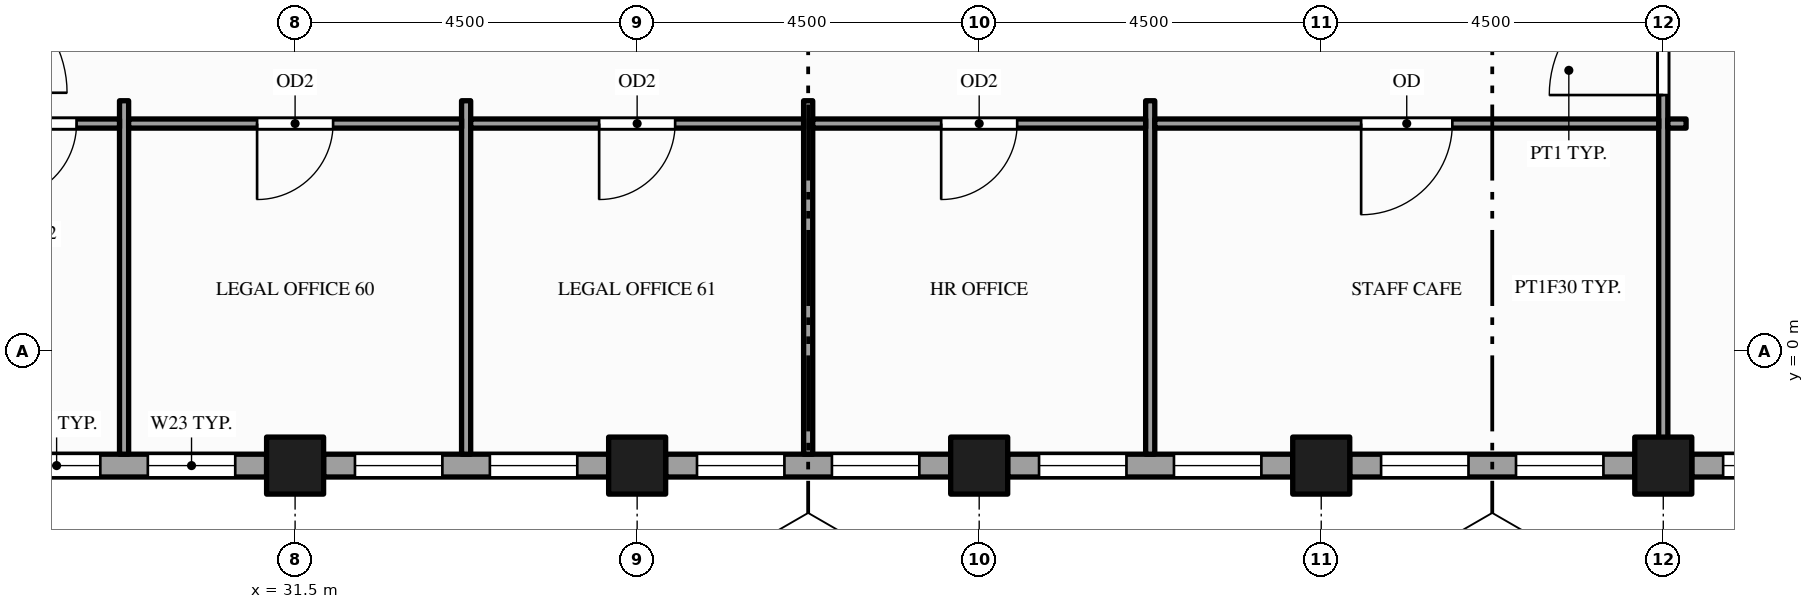
"""IFC4 building model, lengths in metres.
Left out: names, types, materials, properties, quantities, classifications, styles, units other than length and angle.
Written with IfcOpenShell. Run it as: python <this file> out.ifc"""

import sys

from ifc_helpers import new_model, si_unit, direction, frame, frame_2d, origin, origin_2d, place, context, subcontext, project, spatial, rectangle, hollow_rectangle, extrude, element, fill, save


model = new_model("IFC4")
c1 = context("Model", 3, precision=1e-05, world=origin(), true_north=direction((0.0, 1.0)))
c2 = subcontext(c1, "Body", "Model", "MODEL_VIEW")
j1 = project(units=[si_unit("LENGTHUNIT", "METRE"), si_unit("PLANEANGLEUNIT", "RADIAN")], contexts=[c1])
p1 = place(None, origin())
s1 = spatial("IfcSite", under=j1, at=p1, CompositionType="ELEMENT")
p2 = place(p1, origin())
s2 = spatial("IfcBuilding", under=s1, at=p2, CompositionType="ELEMENT")
p3 = place(p2, frame((0.0, 0.0, 223.0)))
s3 = spatial("IfcBuildingStorey", under=s2, at=p3, CompositionType="ELEMENT", Elevation=223.0)
for number, where, z_axis, x_axis in (
    (1, (31.5, -1.5, -0.15), (0.0, 0.0, 1.0), (1.0, 0.0, 0.0)),
    (2, (36.0, -1.5, -0.15), (0.0, 0.0, 1.0), (1.0, 0.0, 0.0)),
    (3, (40.5, -1.5, -0.15), (0.0, 0.0, 1.0), (1.0, 0.0, 0.0)),
    (4, (45.0, -1.5, -0.15), (0.0, 0.0, 1.0), (1.0, 0.0, 0.0)),
    (5, (49.5, -1.5, -0.15), (0.0, 0.0, 1.0), (1.0, 0.0, 0.0)),
):
    element("IfcColumn", number, at=place(p3, frame(where, z_axis=z_axis, x_axis=x_axis)), inside=s3, PredefinedType="COLUMN", context=c2, shape_type="SweptSolid", body=[
        extrude(hollow_rectangle(XDim=0.75, YDim=0.75, WallThickness=0.036, at=origin_2d()), origin(), (0.0, 0.0, 1.0), 4.0),
    ])
p4 = place(p3, frame((27.375, -1.5, 0.0), z_axis=(0.0, 0.0, 1.0), x_axis=(1.0, 0.0, 0.0)))
e6 = element("IfcWall", 6, at=p4, inside=s3, PredefinedType="STANDARD", context=c2, shape_type="SweptSolid", body=[
    extrude(rectangle(XDim=3.75, YDim=0.3, at=frame_2d((1.875, 0.0))), origin(), (0.0, 0.0, 1.0), 2.87),
])
p5 = place(p4, frame((0.413, 0.0, 0.9)))
e7 = element("IfcOpeningElement", 7, at=p5, cuts=e6, PredefinedType="OPENING", context=c2, shape_type="SweptSolid", body=[
    extrude(rectangle(XDim=1.15, YDim=1.75, at=frame_2d((0.575, 0.875))), frame((0.0, 0.16, 0.0), z_axis=(0.0, -1.0, 0.0), x_axis=(1.0, 0.0, 0.0)), (0.0, 0.0, 1.0), 0.32),
])
p6 = place(p4, frame((2.188, 0.0, 0.9)))
e8 = element("IfcOpeningElement", 8, at=p6, cuts=e6, PredefinedType="OPENING", context=c2, shape_type="SweptSolid", body=[
    extrude(rectangle(XDim=1.15, YDim=1.75, at=frame_2d((0.575, 0.875))), frame((0.0, 0.16, 0.0), z_axis=(0.0, -1.0, 0.0), x_axis=(1.0, 0.0, 0.0)), (0.0, 0.0, 1.0), 0.32),
])
p7 = place(p3, frame((31.875, -1.5, 0.0), z_axis=(0.0, 0.0, 1.0), x_axis=(1.0, 0.0, 0.0)))
e9 = element("IfcWall", 9, at=p7, inside=s3, PredefinedType="STANDARD", context=c2, shape_type="SweptSolid", body=[
    extrude(rectangle(XDim=3.75, YDim=0.3, at=frame_2d((1.875, 0.0))), origin(), (0.0, 0.0, 1.0), 2.87),
])
p8 = place(p7, frame((0.413, 0.0, 0.9)))
e10 = element("IfcOpeningElement", 10, at=p8, cuts=e9, PredefinedType="OPENING", context=c2, shape_type="SweptSolid", body=[
    extrude(rectangle(XDim=1.15, YDim=1.75, at=frame_2d((0.575, 0.875))), frame((0.0, 0.16, 0.0), z_axis=(0.0, -1.0, 0.0), x_axis=(1.0, 0.0, 0.0)), (0.0, 0.0, 1.0), 0.32),
])
p9 = place(p7, frame((2.188, 0.0, 0.9)))
e11 = element("IfcOpeningElement", 11, at=p9, cuts=e9, PredefinedType="OPENING", context=c2, shape_type="SweptSolid", body=[
    extrude(rectangle(XDim=1.15, YDim=1.75, at=frame_2d((0.575, 0.875))), frame((0.0, 0.16, 0.0), z_axis=(0.0, -1.0, 0.0), x_axis=(1.0, 0.0, 0.0)), (0.0, 0.0, 1.0), 0.32),
])
p10 = place(p3, frame((36.375, -1.5, 0.0), z_axis=(0.0, 0.0, 1.0), x_axis=(1.0, 0.0, 0.0)))
e12 = element("IfcWall", 12, at=p10, inside=s3, PredefinedType="STANDARD", context=c2, shape_type="SweptSolid", body=[
    extrude(rectangle(XDim=3.75, YDim=0.3, at=frame_2d((1.875, 0.0))), origin(), (0.0, 0.0, 1.0), 2.87),
])
p11 = place(p10, frame((0.413, 0.0, 0.9)))
e13 = element("IfcOpeningElement", 13, at=p11, cuts=e12, PredefinedType="OPENING", context=c2, shape_type="SweptSolid", body=[
    extrude(rectangle(XDim=1.15, YDim=1.75, at=frame_2d((0.575, 0.875))), frame((0.0, 0.16, 0.0), z_axis=(0.0, -1.0, 0.0), x_axis=(1.0, 0.0, 0.0)), (0.0, 0.0, 1.0), 0.32),
])
p12 = place(p10, frame((2.188, 0.0, 0.9)))
e14 = element("IfcOpeningElement", 14, at=p12, cuts=e12, PredefinedType="OPENING", context=c2, shape_type="SweptSolid", body=[
    extrude(rectangle(XDim=1.15, YDim=1.75, at=frame_2d((0.575, 0.875))), frame((0.0, 0.16, 0.0), z_axis=(0.0, -1.0, 0.0), x_axis=(1.0, 0.0, 0.0)), (0.0, 0.0, 1.0), 0.32),
])
p13 = place(p3, frame((40.875, -1.5, 0.0), z_axis=(0.0, 0.0, 1.0), x_axis=(1.0, 0.0, 0.0)))
e15 = element("IfcWall", 15, at=p13, inside=s3, PredefinedType="STANDARD", context=c2, shape_type="SweptSolid", body=[
    extrude(rectangle(XDim=3.75, YDim=0.3, at=frame_2d((1.875, 0.0))), origin(), (0.0, 0.0, 1.0), 2.87),
])
p14 = place(p13, frame((0.413, 0.0, 0.9)))
e16 = element("IfcOpeningElement", 16, at=p14, cuts=e15, PredefinedType="OPENING", context=c2, shape_type="SweptSolid", body=[
    extrude(rectangle(XDim=1.15, YDim=1.75, at=frame_2d((0.575, 0.875))), frame((0.0, 0.16, 0.0), z_axis=(0.0, -1.0, 0.0), x_axis=(1.0, 0.0, 0.0)), (0.0, 0.0, 1.0), 0.32),
])
p15 = place(p13, frame((2.188, 0.0, 0.9)))
e17 = element("IfcOpeningElement", 17, at=p15, cuts=e15, PredefinedType="OPENING", context=c2, shape_type="SweptSolid", body=[
    extrude(rectangle(XDim=1.15, YDim=1.75, at=frame_2d((0.575, 0.875))), frame((0.0, 0.16, 0.0), z_axis=(0.0, -1.0, 0.0), x_axis=(1.0, 0.0, 0.0)), (0.0, 0.0, 1.0), 0.32),
])
p16 = place(p3, frame((45.375, -1.5, 0.0), z_axis=(0.0, 0.0, 1.0), x_axis=(1.0, 0.0, 0.0)))
e18 = element("IfcWall", 18, at=p16, inside=s3, PredefinedType="STANDARD", context=c2, shape_type="SweptSolid", body=[
    extrude(rectangle(XDim=3.75, YDim=0.3, at=frame_2d((1.875, 0.0))), origin(), (0.0, 0.0, 1.0), 2.87),
])
p17 = place(p16, frame((0.413, 0.0, 0.9)))
e19 = element("IfcOpeningElement", 19, at=p17, cuts=e18, PredefinedType="OPENING", context=c2, shape_type="SweptSolid", body=[
    extrude(rectangle(XDim=1.15, YDim=1.75, at=frame_2d((0.575, 0.875))), frame((0.0, 0.16, 0.0), z_axis=(0.0, -1.0, 0.0), x_axis=(1.0, 0.0, 0.0)), (0.0, 0.0, 1.0), 0.32),
])
p18 = place(p16, frame((2.188, 0.0, 0.9)))
e20 = element("IfcOpeningElement", 20, at=p18, cuts=e18, PredefinedType="OPENING", context=c2, shape_type="SweptSolid", body=[
    extrude(rectangle(XDim=1.15, YDim=1.75, at=frame_2d((0.575, 0.875))), frame((0.0, 0.16, 0.0), z_axis=(0.0, -1.0, 0.0), x_axis=(1.0, 0.0, 0.0)), (0.0, 0.0, 1.0), 0.32),
])
p19 = place(p3, frame((49.875, -1.5, 0.0), z_axis=(0.0, 0.0, 1.0), x_axis=(1.0, 0.0, 0.0)))
e21 = element("IfcWall", 21, at=p19, inside=s3, PredefinedType="STANDARD", context=c2, shape_type="SweptSolid", body=[
    extrude(rectangle(XDim=3.75, YDim=0.3, at=frame_2d((1.875, 0.0))), origin(), (0.0, 0.0, 1.0), 2.87),
])
p20 = place(p19, frame((0.413, 0.0, 0.9)))
e22 = element("IfcOpeningElement", 22, at=p20, cuts=e21, PredefinedType="OPENING", context=c2, shape_type="SweptSolid", body=[
    extrude(rectangle(XDim=1.15, YDim=1.75, at=frame_2d((0.575, 0.875))), frame((0.0, 0.16, 0.0), z_axis=(0.0, -1.0, 0.0), x_axis=(1.0, 0.0, 0.0)), (0.0, 0.0, 1.0), 0.32),
])
p21 = place(p19, frame((2.188, 0.0, 0.9)))
e23 = element("IfcOpeningElement", 23, at=p21, cuts=e21, PredefinedType="OPENING", context=c2, shape_type="SweptSolid", body=[
    extrude(rectangle(XDim=1.15, YDim=1.75, at=frame_2d((0.575, 0.875))), frame((0.0, 0.16, 0.0), z_axis=(0.0, -1.0, 0.0), x_axis=(1.0, 0.0, 0.0)), (0.0, 0.0, 1.0), 0.32),
])
for number, where, z_axis, x_axis in (
    (24, (29.25, -1.35, 0.0), (0.0, 0.0, 1.0), (0.0, 1.0, 0.0)),
    (25, (33.75, -1.35, 0.0), (0.0, 0.0, 1.0), (0.0, 1.0, 0.0)),
    (26, (38.25, -1.35, 0.0), (0.0, 0.0, 1.0), (0.0, 1.0, 0.0)),
    (27, (42.75, -1.35, 0.0), (0.0, 0.0, 1.0), (0.0, 1.0, 0.0)),
):
    element("IfcWall", number, at=place(p3, frame(where, z_axis=z_axis, x_axis=x_axis)), inside=s3, PredefinedType="PARTITIONING", context=c2, shape_type="SweptSolid", body=[
        extrude(rectangle(XDim=4.65, YDim=0.12, at=frame_2d((2.325, 0.0))), origin(), (0.0, 0.0, 1.0), 2.87),
    ])
p22 = place(p3, frame((49.5, -1.35, 0.0), z_axis=(0.0, 0.0, 1.0), x_axis=(0.0, 1.0, 0.0)))
e28 = element("IfcWall", 28, at=p22, inside=s3, PredefinedType="PARTITIONING", context=c2, shape_type="SweptSolid", body=[
    extrude(rectangle(XDim=22.2, YDim=0.12, at=frame_2d((11.1, 0.0))), origin(), (0.0, 0.0, 1.0), 2.87),
])
p23 = place(p22, frame((4.725, 0.0, 0.0)))
e29 = element("IfcOpeningElement", 29, at=p23, cuts=e28, PredefinedType="OPENING", context=c2, shape_type="SweptSolid", body=[
    extrude(rectangle(XDim=1.5, YDim=2.1, at=frame_2d((0.75, 1.05))), frame((0.0, 0.07, 0.0), z_axis=(0.0, -1.0, 0.0), x_axis=(1.0, 0.0, 0.0)), (0.0, 0.0, 1.0), 0.14),
])
p24 = place(p22, frame((15.975, 0.0, 0.0)))
e30 = element("IfcOpeningElement", 30, at=p24, cuts=e28, PredefinedType="OPENING", context=c2, shape_type="SweptSolid", body=[
    extrude(rectangle(XDim=1.5, YDim=2.1, at=frame_2d((0.75, 1.05))), frame((0.0, 0.07, 0.0), z_axis=(0.0, -1.0, 0.0), x_axis=(1.0, 0.0, 0.0)), (0.0, 0.0, 1.0), 0.14),
])
p25 = place(p22, frame((7.6, 0.0, 0.0)))
e31 = element("IfcOpeningElement", 31, at=p25, cuts=e28, PredefinedType="OPENING", context=c2, shape_type="SweptSolid", body=[
    extrude(rectangle(XDim=0.9, YDim=2.1, at=frame_2d((0.45, 1.05))), frame((0.0, 0.07, 0.0), z_axis=(0.0, -1.0, 0.0), x_axis=(1.0, 0.0, 0.0)), (0.0, 0.0, 1.0), 0.14),
])
p26 = place(p22, frame((10.65, 0.0, 0.0)))
e32 = element("IfcOpeningElement", 32, at=p26, cuts=e28, PredefinedType="OPENING", context=c2, shape_type="SweptSolid", body=[
    extrude(rectangle(XDim=0.9, YDim=2.1, at=frame_2d((0.45, 1.05))), frame((0.0, 0.07, 0.0), z_axis=(0.0, -1.0, 0.0), x_axis=(1.0, 0.0, 0.0)), (0.0, 0.0, 1.0), 0.14),
])
p27 = place(p22, frame((13.6, 0.0, 0.0)))
e33 = element("IfcOpeningElement", 33, at=p27, cuts=e28, PredefinedType="OPENING", context=c2, shape_type="SweptSolid", body=[
    extrude(rectangle(XDim=1.0, YDim=2.1, at=frame_2d((0.5, 1.05))), frame((0.0, 0.07, 0.0), z_axis=(0.0, -1.0, 0.0), x_axis=(1.0, 0.0, 0.0)), (0.0, 0.0, 1.0), 0.14),
])
p28 = place(p3, frame((27.06, 3.0, 0.0), z_axis=(0.0, 0.0, 1.0), x_axis=(1.0, 0.0, 0.0)))
e34 = element("IfcWall", 34, at=p28, inside=s3, PredefinedType="PARTITIONING", context=c2, shape_type="SweptSolid", body=[
    extrude(rectangle(XDim=2.13, YDim=0.12, at=frame_2d((1.065, 0.0))), origin(), (0.0, 0.0, 1.0), 2.87),
])
p29 = place(p28, frame((0.565, 0.0, 0.0)))
e35 = element("IfcOpeningElement", 35, at=p29, cuts=e34, PredefinedType="OPENING", context=c2, shape_type="SweptSolid", body=[
    extrude(rectangle(XDim=1.0, YDim=2.1, at=frame_2d((0.5, 1.05))), frame((0.0, 0.07, 0.0), z_axis=(0.0, -1.0, 0.0), x_axis=(1.0, 0.0, 0.0)), (0.0, 0.0, 1.0), 0.14),
])
p30 = place(p3, frame((29.31, 3.0, 0.0), z_axis=(0.0, 0.0, 1.0), x_axis=(1.0, 0.0, 0.0)))
e36 = element("IfcWall", 36, at=p30, inside=s3, PredefinedType="PARTITIONING", context=c2, shape_type="SweptSolid", body=[
    extrude(rectangle(XDim=4.38, YDim=0.12, at=frame_2d((2.19, 0.0))), origin(), (0.0, 0.0, 1.0), 2.87),
])
p31 = place(p30, frame((1.69, 0.0, 0.0)))
e37 = element("IfcOpeningElement", 37, at=p31, cuts=e36, PredefinedType="OPENING", context=c2, shape_type="SweptSolid", body=[
    extrude(rectangle(XDim=1.0, YDim=2.1, at=frame_2d((0.5, 1.05))), frame((0.0, 0.07, 0.0), z_axis=(0.0, -1.0, 0.0), x_axis=(1.0, 0.0, 0.0)), (0.0, 0.0, 1.0), 0.14),
])
p32 = place(p3, frame((33.81, 3.0, 0.0), z_axis=(0.0, 0.0, 1.0), x_axis=(1.0, 0.0, 0.0)))
e38 = element("IfcWall", 38, at=p32, inside=s3, PredefinedType="PARTITIONING", context=c2, shape_type="SweptSolid", body=[
    extrude(rectangle(XDim=4.38, YDim=0.12, at=frame_2d((2.19, 0.0))), origin(), (0.0, 0.0, 1.0), 2.87),
])
p33 = place(p32, frame((1.69, 0.0, 0.0)))
e39 = element("IfcOpeningElement", 39, at=p33, cuts=e38, PredefinedType="OPENING", context=c2, shape_type="SweptSolid", body=[
    extrude(rectangle(XDim=1.0, YDim=2.1, at=frame_2d((0.5, 1.05))), frame((0.0, 0.07, 0.0), z_axis=(0.0, -1.0, 0.0), x_axis=(1.0, 0.0, 0.0)), (0.0, 0.0, 1.0), 0.14),
])
p34 = place(p3, frame((38.31, 3.0, 0.0), z_axis=(0.0, 0.0, 1.0), x_axis=(1.0, 0.0, 0.0)))
e40 = element("IfcWall", 40, at=p34, inside=s3, PredefinedType="PARTITIONING", context=c2, shape_type="SweptSolid", body=[
    extrude(rectangle(XDim=4.38, YDim=0.12, at=frame_2d((2.19, 0.0))), origin(), (0.0, 0.0, 1.0), 2.87),
])
p35 = place(p34, frame((1.69, 0.0, 0.0)))
e41 = element("IfcOpeningElement", 41, at=p35, cuts=e40, PredefinedType="OPENING", context=c2, shape_type="SweptSolid", body=[
    extrude(rectangle(XDim=1.0, YDim=2.1, at=frame_2d((0.5, 1.05))), frame((0.0, 0.07, 0.0), z_axis=(0.0, -1.0, 0.0), x_axis=(1.0, 0.0, 0.0)), (0.0, 0.0, 1.0), 0.14),
])
p36 = place(p3, frame((42.81, 3.0, 0.0), z_axis=(0.0, 0.0, 1.0), x_axis=(1.0, 0.0, 0.0)))
e42 = element("IfcWall", 42, at=p36, inside=s3, PredefinedType="PARTITIONING", context=c2, shape_type="SweptSolid", body=[
    extrude(rectangle(XDim=6.63, YDim=0.12, at=frame_2d((3.315, 0.0))), origin(), (0.0, 0.0, 1.0), 2.87),
])
p37 = place(p36, frame((2.715, 0.0, 0.0)))
e43 = element("IfcOpeningElement", 43, at=p37, cuts=e42, PredefinedType="OPENING", context=c2, shape_type="SweptSolid", body=[
    extrude(rectangle(XDim=1.2, YDim=2.1, at=frame_2d((0.6, 1.05))), frame((0.0, 0.07, 0.0), z_axis=(0.0, -1.0, 0.0), x_axis=(1.0, 0.0, 0.0)), (0.0, 0.0, 1.0), 0.14),
])
p38 = place(p3, frame((49.56, 3.0, 0.0), z_axis=(0.0, 0.0, 1.0), x_axis=(1.0, 0.0, 0.0)))
e44 = element("IfcWall", 44, at=p38, inside=s3, PredefinedType="PARTITIONING", context=c2, shape_type="SweptSolid", body=[
    extrude(rectangle(XDim=0.24, YDim=0.12, at=frame_2d((0.12, 0.0))), origin(), (0.0, 0.0, 1.0), 2.87),
])
p39 = place(p5, origin())
e45 = element("IfcWindow", 45, at=p39, inside=s3, PartitioningType="SINGLE_PANEL", PredefinedType="WINDOW", context=c2, shape_type="SweptSolid", body=[
    extrude(rectangle(XDim=1.15, YDim=1.75, at=frame_2d((0.575, 0.875))), frame((0.0, 0.03, 0.0), z_axis=(0.0, -1.0, 0.0), x_axis=(1.0, 0.0, 0.0)), (0.0, 0.0, 1.0), 0.06),
])
fill(e7, e45)
p40 = place(p6, origin())
e46 = element("IfcWindow", 46, at=p40, inside=s3, PartitioningType="SINGLE_PANEL", PredefinedType="WINDOW", context=c2, shape_type="SweptSolid", body=[
    extrude(rectangle(XDim=1.15, YDim=1.75, at=frame_2d((0.575, 0.875))), frame((0.0, 0.03, 0.0), z_axis=(0.0, -1.0, 0.0), x_axis=(1.0, 0.0, 0.0)), (0.0, 0.0, 1.0), 0.06),
])
fill(e8, e46)
p41 = place(p8, origin())
e47 = element("IfcWindow", 47, at=p41, inside=s3, PartitioningType="SINGLE_PANEL", PredefinedType="WINDOW", context=c2, shape_type="SweptSolid", body=[
    extrude(rectangle(XDim=1.15, YDim=1.75, at=frame_2d((0.575, 0.875))), frame((0.0, 0.03, 0.0), z_axis=(0.0, -1.0, 0.0), x_axis=(1.0, 0.0, 0.0)), (0.0, 0.0, 1.0), 0.06),
])
fill(e10, e47)
p42 = place(p9, origin())
e48 = element("IfcWindow", 48, at=p42, inside=s3, PartitioningType="SINGLE_PANEL", PredefinedType="WINDOW", context=c2, shape_type="SweptSolid", body=[
    extrude(rectangle(XDim=1.15, YDim=1.75, at=frame_2d((0.575, 0.875))), frame((0.0, 0.03, 0.0), z_axis=(0.0, -1.0, 0.0), x_axis=(1.0, 0.0, 0.0)), (0.0, 0.0, 1.0), 0.06),
])
fill(e11, e48)
p43 = place(p11, origin())
e49 = element("IfcWindow", 49, at=p43, inside=s3, PartitioningType="SINGLE_PANEL", PredefinedType="WINDOW", context=c2, shape_type="SweptSolid", body=[
    extrude(rectangle(XDim=1.15, YDim=1.75, at=frame_2d((0.575, 0.875))), frame((0.0, 0.03, 0.0), z_axis=(0.0, -1.0, 0.0), x_axis=(1.0, 0.0, 0.0)), (0.0, 0.0, 1.0), 0.06),
])
fill(e13, e49)
p44 = place(p12, origin())
e50 = element("IfcWindow", 50, at=p44, inside=s3, PartitioningType="SINGLE_PANEL", PredefinedType="WINDOW", context=c2, shape_type="SweptSolid", body=[
    extrude(rectangle(XDim=1.15, YDim=1.75, at=frame_2d((0.575, 0.875))), frame((0.0, 0.03, 0.0), z_axis=(0.0, -1.0, 0.0), x_axis=(1.0, 0.0, 0.0)), (0.0, 0.0, 1.0), 0.06),
])
fill(e14, e50)
p45 = place(p14, origin())
e51 = element("IfcWindow", 51, at=p45, inside=s3, PartitioningType="SINGLE_PANEL", PredefinedType="WINDOW", context=c2, shape_type="SweptSolid", body=[
    extrude(rectangle(XDim=1.15, YDim=1.75, at=frame_2d((0.575, 0.875))), frame((0.0, 0.03, 0.0), z_axis=(0.0, -1.0, 0.0), x_axis=(1.0, 0.0, 0.0)), (0.0, 0.0, 1.0), 0.06),
])
fill(e16, e51)
p46 = place(p15, origin())
e52 = element("IfcWindow", 52, at=p46, inside=s3, PartitioningType="SINGLE_PANEL", PredefinedType="WINDOW", context=c2, shape_type="SweptSolid", body=[
    extrude(rectangle(XDim=1.15, YDim=1.75, at=frame_2d((0.575, 0.875))), frame((0.0, 0.03, 0.0), z_axis=(0.0, -1.0, 0.0), x_axis=(1.0, 0.0, 0.0)), (0.0, 0.0, 1.0), 0.06),
])
fill(e17, e52)
p47 = place(p17, origin())
e53 = element("IfcWindow", 53, at=p47, inside=s3, PartitioningType="SINGLE_PANEL", PredefinedType="WINDOW", context=c2, shape_type="SweptSolid", body=[
    extrude(rectangle(XDim=1.15, YDim=1.75, at=frame_2d((0.575, 0.875))), frame((0.0, 0.03, 0.0), z_axis=(0.0, -1.0, 0.0), x_axis=(1.0, 0.0, 0.0)), (0.0, 0.0, 1.0), 0.06),
])
fill(e19, e53)
p48 = place(p18, origin())
e54 = element("IfcWindow", 54, at=p48, inside=s3, PartitioningType="SINGLE_PANEL", PredefinedType="WINDOW", context=c2, shape_type="SweptSolid", body=[
    extrude(rectangle(XDim=1.15, YDim=1.75, at=frame_2d((0.575, 0.875))), frame((0.0, 0.03, 0.0), z_axis=(0.0, -1.0, 0.0), x_axis=(1.0, 0.0, 0.0)), (0.0, 0.0, 1.0), 0.06),
])
fill(e20, e54)
p49 = place(p20, origin())
e55 = element("IfcWindow", 55, at=p49, inside=s3, PartitioningType="SINGLE_PANEL", PredefinedType="WINDOW", context=c2, shape_type="SweptSolid", body=[
    extrude(rectangle(XDim=1.15, YDim=1.75, at=frame_2d((0.575, 0.875))), frame((0.0, 0.03, 0.0), z_axis=(0.0, -1.0, 0.0), x_axis=(1.0, 0.0, 0.0)), (0.0, 0.0, 1.0), 0.06),
])
fill(e22, e55)
p50 = place(p23, origin())
e56 = element("IfcDoor", 56, at=p50, inside=s3, OperationType="SINGLE_SWING_LEFT", PredefinedType="DOOR", context=c2, shape_type="SweptSolid", body=[
    extrude(rectangle(XDim=1.5, YDim=2.1, at=frame_2d((0.75, 1.05))), frame((0.0, 0.025, 0.0), z_axis=(0.0, -1.0, 0.0), x_axis=(1.0, 0.0, 0.0)), (0.0, 0.0, 1.0), 0.05),
])
fill(e29, e56)
p51 = place(p29, origin())
e57 = element("IfcDoor", 57, at=p51, inside=s3, OperationType="SINGLE_SWING_LEFT", PredefinedType="DOOR", context=c2, shape_type="SweptSolid", body=[
    extrude(rectangle(XDim=1.0, YDim=2.1, at=frame_2d((0.5, 1.05))), frame((0.0, 0.025, 0.0), z_axis=(0.0, -1.0, 0.0), x_axis=(1.0, 0.0, 0.0)), (0.0, 0.0, 1.0), 0.05),
])
fill(e35, e57)
p52 = place(p31, origin())
e58 = element("IfcDoor", 58, at=p52, inside=s3, OperationType="SINGLE_SWING_LEFT", PredefinedType="DOOR", context=c2, shape_type="SweptSolid", body=[
    extrude(rectangle(XDim=1.0, YDim=2.1, at=frame_2d((0.5, 1.05))), frame((0.0, 0.025, 0.0), z_axis=(0.0, -1.0, 0.0), x_axis=(1.0, 0.0, 0.0)), (0.0, 0.0, 1.0), 0.05),
])
fill(e37, e58)
p53 = place(p33, origin())
e59 = element("IfcDoor", 59, at=p53, inside=s3, OperationType="SINGLE_SWING_LEFT", PredefinedType="DOOR", context=c2, shape_type="SweptSolid", body=[
    extrude(rectangle(XDim=1.0, YDim=2.1, at=frame_2d((0.5, 1.05))), frame((0.0, 0.025, 0.0), z_axis=(0.0, -1.0, 0.0), x_axis=(1.0, 0.0, 0.0)), (0.0, 0.0, 1.0), 0.05),
])
fill(e39, e59)
p54 = place(p35, origin())
e60 = element("IfcDoor", 60, at=p54, inside=s3, OperationType="SINGLE_SWING_LEFT", PredefinedType="DOOR", context=c2, shape_type="SweptSolid", body=[
    extrude(rectangle(XDim=1.0, YDim=2.1, at=frame_2d((0.5, 1.05))), frame((0.0, 0.025, 0.0), z_axis=(0.0, -1.0, 0.0), x_axis=(1.0, 0.0, 0.0)), (0.0, 0.0, 1.0), 0.05),
])
fill(e41, e60)
p55 = place(p37, origin())
e61 = element("IfcDoor", 61, at=p55, inside=s3, OperationType="SINGLE_SWING_LEFT", PredefinedType="DOOR", context=c2, shape_type="SweptSolid", body=[
    extrude(rectangle(XDim=1.2, YDim=2.1, at=frame_2d((0.6, 1.05))), frame((0.0, 0.025, 0.0), z_axis=(0.0, -1.0, 0.0), x_axis=(1.0, 0.0, 0.0)), (0.0, 0.0, 1.0), 0.05),
])
fill(e43, e61)
save(model, sys.argv[1])
